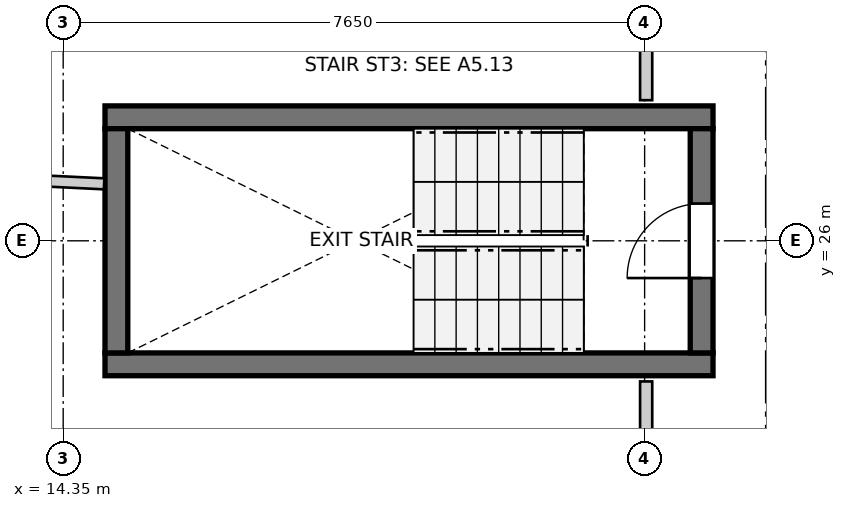
"""IFC4 building model, lengths in metres.
Left out: names, types, materials, properties, quantities, classifications, styles, units other than length and angle.
Written with IfcOpenShell. Run it as: python <this file> out.ifc"""

import sys

from ifc_helpers import new_model, si_unit, direction, frame, frame_2d, origin, place, context, subcontext, project, spatial, rectangle, extrude, source, transform, mapped, element, fill, save


model = new_model("IFC4")
c1 = context("Model", 3, precision=1e-05, world=origin(), true_north=direction((0.0, 1.0)))
c2 = subcontext(c1, "Body", "Model", "MODEL_VIEW")
j1 = project(units=[si_unit("LENGTHUNIT", "METRE"), si_unit("PLANEANGLEUNIT", "RADIAN")], contexts=[c1])
p1 = place(None, origin())
s1 = spatial("IfcSite", under=j1, at=p1, CompositionType="ELEMENT")
p2 = place(p1, origin())
s2 = spatial("IfcBuilding", under=s1, at=p2, CompositionType="ELEMENT")
p3 = place(p2, frame((0.0, 0.0, 43.0)))
s3 = spatial("IfcBuildingStorey", under=s2, at=p3, CompositionType="ELEMENT", Elevation=43.0)
for number, where, z_axis, x_axis in (
    (1, (14.9, 24.375, 0.0), (0.0, 0.0, 1.0), (1.0, 0.0, 0.0)),
    (2, (22.9, 27.625, 0.0), (0.0, 0.0, 1.0), (-1.0, 0.0, 0.0)),
):
    element("IfcWall", number, at=place(p3, frame(where, z_axis=z_axis, x_axis=x_axis)), inside=s3, PredefinedType="SHEAR", context=c2, shape_type="SweptSolid", body=[
        extrude(rectangle(XDim=8.0, YDim=0.3, at=frame_2d((4.0, 0.0))), origin(), (0.0, 0.0, 1.0), 2.94),
    ])
p4 = place(p3, frame((15.05, 27.475, 0.0), z_axis=(0.0, 0.0, 1.0), x_axis=(0.0, -1.0, 0.0)))
e3 = element("IfcWall", 3, at=p4, inside=s3, PredefinedType="SHEAR", context=c2, shape_type="SweptSolid", body=[
    extrude(rectangle(XDim=2.95, YDim=0.3, at=frame_2d((1.475, 0.0))), origin(), (0.0, 0.0, 1.0), 2.94),
])
p5 = place(p3, frame((22.75, 24.525, 0.0), z_axis=(0.0, 0.0, 1.0), x_axis=(0.0, 1.0, 0.0)))
e4 = element("IfcWall", 4, at=p5, inside=s3, PredefinedType="SHEAR", context=c2, shape_type="SweptSolid", body=[
    extrude(rectangle(XDim=2.95, YDim=0.3, at=frame_2d((1.475, 0.0))), origin(), (0.0, 0.0, 1.0), 2.94),
])
p6 = place(p5, frame((0.985, 0.0, 0.0)))
e5 = element("IfcOpeningElement", 5, at=p6, cuts=e4, PredefinedType="OPENING", context=c2, shape_type="SweptSolid", body=[
    extrude(rectangle(XDim=0.98, YDim=2.15, at=frame_2d((0.49, 1.075))), frame((0.0, 0.16, 0.0), z_axis=(0.0, -1.0, 0.0), x_axis=(1.0, 0.0, 0.0)), (0.0, 0.0, 1.0), 0.32),
])
p7 = place(p3, frame((22.02, 18.722, 0.0), z_axis=(0.0, 0.0, 1.0), x_axis=(0.0, 1.0, 0.0)))
e6 = element("IfcWall", 6, at=p7, inside=s3, PredefinedType="PARTITIONING", context=c2, shape_type="SweptSolid", body=[
    extrude(rectangle(XDim=5.428, YDim=0.16, at=frame_2d((2.714, 0.0))), origin(), (0.0, 0.0, 1.0), 2.94),
])
p8 = place(p7, frame((1.996, 0.0, 0.0)))
e7 = element("IfcOpeningElement", 7, at=p8, cuts=e6, PredefinedType="OPENING", context=c2, shape_type="SweptSolid", body=[
    extrude(rectangle(XDim=0.96, YDim=2.1, at=frame_2d((0.48, 1.05))), frame((0.0, 0.09, 0.0), z_axis=(0.0, -1.0, 0.0), x_axis=(1.0, 0.0, 0.0)), (0.0, 0.0, 1.0), 0.18),
])
p9 = place(p3, frame((22.02, 27.85, 0.0), z_axis=(0.0, 0.0, 1.0), x_axis=(0.0, 1.0, 0.0)))
e8 = element("IfcWall", 8, at=p9, inside=s3, PredefinedType="PARTITIONING", context=c2, shape_type="SweptSolid", body=[
    extrude(rectangle(XDim=3.569, YDim=0.16, at=frame_2d((1.784, 0.0))), origin(), (0.0, 0.0, 1.0), 2.94),
])
p10 = place(p9, frame((1.325, 0.0, 0.0)))
e9 = element("IfcOpeningElement", 9, at=p10, cuts=e8, PredefinedType="OPENING", context=c2, shape_type="SweptSolid", body=[
    extrude(rectangle(XDim=0.96, YDim=2.1, at=frame_2d((0.48, 1.05))), frame((0.0, 0.09, 0.0), z_axis=(0.0, -1.0, 0.0), x_axis=(1.0, 0.0, 0.0)), (0.0, 0.0, 1.0), 0.18),
])
p11 = place(p3, frame((3.765, 27.289, 0.0), z_axis=(0.0, 0.0, 1.0), x_axis=(0.998826748689, -0.048426502082, 0.0)))
e10 = element("IfcWall", 10, at=p11, inside=s3, PredefinedType="PARTITIONING", context=c2, shape_type="SweptSolid", body=[
    extrude(rectangle(XDim=11.137, YDim=0.145, at=frame_2d((5.568, 0.0))), origin(), (0.0, 0.0, 1.0), 2.94),
])
m1 = source(origin(), c2, "Body", "SweptSolid", [
    extrude(rectangle(XDim=0.98, YDim=2.15, at=frame_2d((0.49, 1.075))), frame((0.0, 0.025, 0.0), z_axis=(0.0, -1.0, 0.0), x_axis=(1.0, 0.0, 0.0)), (0.0, 0.0, 1.0), 0.05),
])
p12 = place(p6, origin())
e11 = element("IfcDoor", 11, at=p12, inside=s3, OperationType="SINGLE_SWING_LEFT", PredefinedType="DOOR", context=c2, shape_type="MappedRepresentation", body=[
    mapped(m1, transform((0.0, 0.0, 0.0), x_axis=(1.0, 0.0, 0.0), y_axis=(0.0, 1.0, 0.0), z_axis=(0.0, 0.0, 1.0), scale=1.0)),
])
fill(e5, e11)
save(model, sys.argv[1])
